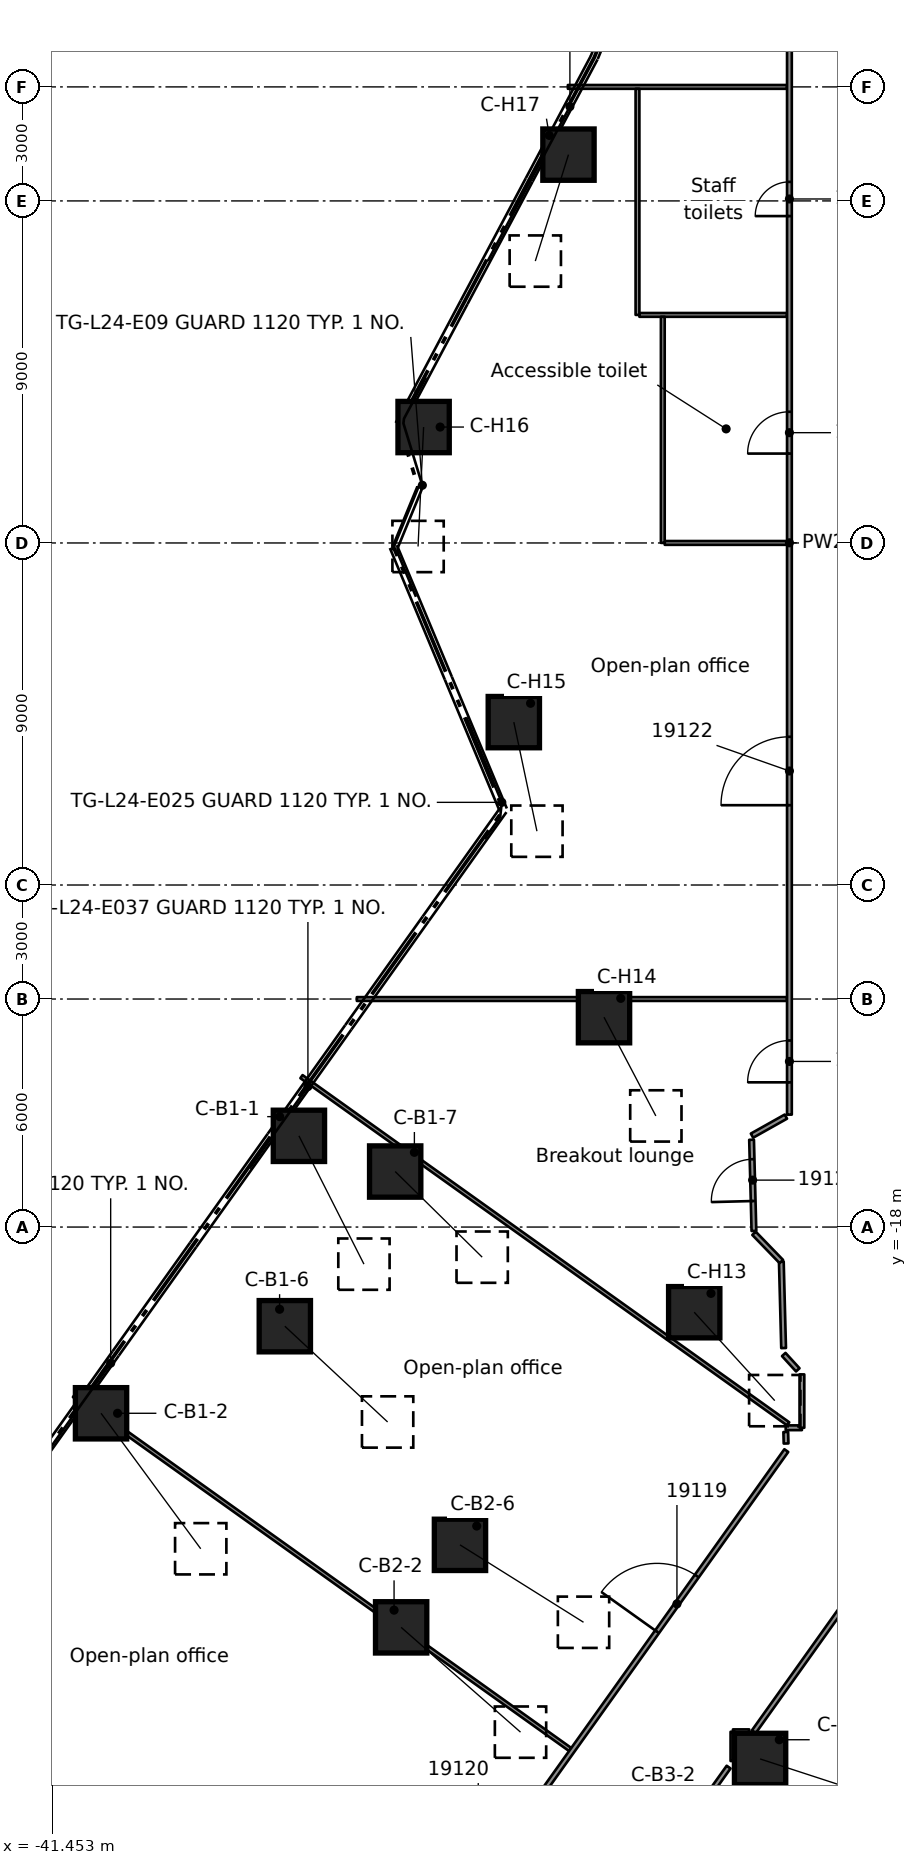
"""IFC4 building model, lengths in metres.
Left out: names, types, materials, properties, quantities, classifications, styles, units other than length and angle.
Written with IfcOpenShell. Run it as: python <this file> out.ifc"""

import sys

from ifc_helpers import new_model, si_unit, direction, frame, frame_2d, origin, origin_2d, place, context, subcontext, project, spatial, rectangle, extrude, element, fill, save


model = new_model("IFC4")
c1 = context("Model", 3, precision=1e-05, world=origin(), true_north=direction((0.0, 1.0)))
c2 = subcontext(c1, "Body", "Model", "MODEL_VIEW")
j1 = project(units=[si_unit("LENGTHUNIT", "METRE"), si_unit("PLANEANGLEUNIT", "RADIAN")], contexts=[c1])
p1 = place(None, origin())
s1 = spatial("IfcSite", under=j1, at=p1, CompositionType="ELEMENT")
p2 = place(p1, origin())
s2 = spatial("IfcBuilding", under=s1, at=p2, CompositionType="ELEMENT")
p3 = place(p2, frame((0.0, 0.0, 98.2)))
s3 = spatial("IfcBuildingStorey", under=s2, at=p3, CompositionType="ELEMENT", Elevation=98.2)
p4 = place(p3, frame((-34.957, -15.6, 0.534), z_axis=(0.357328867204, -0.705071857263, 0.612527351844), x_axis=(0.891988612188, 0.452057867675, 0.0)))
e1 = element("IfcColumn", 1, at=p4, inside=s3, PredefinedType="COLUMN", context=c2, shape_type="SweptSolid", body=[
    extrude(rectangle(XDim=1.35, YDim=1.35, at=origin_2d()), origin(), (0.0, 0.0, 1.0), 4.788),
])
p5 = place(p3, frame((-40.164, -22.9, 0.567), z_axis=(0.497397176201, -0.676050908792, 0.543646224882), x_axis=(0.805479866843, 0.592623138352, 0.0)))
e2 = element("IfcColumn", 2, at=p5, inside=s3, PredefinedType="COLUMN", context=c2, shape_type="SweptSolid", body=[
    extrude(rectangle(XDim=1.35, YDim=1.35, at=origin_2d()), origin(), (0.0, 0.0, 1.0), 5.273),
])
p6 = place(p3, frame((-45.371, -30.2, 0.593), z_axis=(0.602031387632, -0.638952324691, 0.478850848468), x_axis=(0.727822118455, 0.685765968744, 0.0)))
e3 = element("IfcColumn", 3, at=p6, inside=s3, PredefinedType="COLUMN", context=c2, shape_type="SweptSolid", body=[
    extrude(rectangle(XDim=1.35, YDim=1.35, at=origin_2d()), origin(), (0.0, 0.0, 1.0), 5.878),
])
p7 = place(p3, frame((-35.328, -20.609, 0.528), z_axis=(0.572340427973, -0.533233856624, 0.622967164991), x_axis=(0.681668558156, 0.731661107906, 0.0)))
e4 = element("IfcColumn", 4, at=p7, inside=s3, PredefinedType="COLUMN", context=c2, shape_type="SweptSolid", body=[
    extrude(rectangle(XDim=1.35, YDim=1.35, at=origin_2d()), origin(), (0.0, 0.0, 1.0), 4.726),
])
p8 = place(p3, frame((-32.424, -16.539, 0.492), z_axis=(0.519558048031, -0.511356833109, 0.684524377914), x_axis=(0.701459353772, 0.712709460443, 0.0)))
e5 = element("IfcColumn", 5, at=p8, inside=s3, PredefinedType="COLUMN", context=c2, shape_type="SweptSolid", body=[
    extrude(rectangle(XDim=1.35, YDim=1.35, at=origin_2d()), origin(), (0.0, 0.0, 1.0), 4.406),
])
p9 = place(p3, frame((-32.267, -28.533, 0.555), z_axis=(0.618188651788, -0.542608770763, 0.568698964912), x_axis=(0.659670030756, 0.751555354264, 0.0)))
e6 = element("IfcColumn", 6, at=p9, inside=s3, PredefinedType="COLUMN", context=c2, shape_type="SweptSolid", body=[
    extrude(rectangle(XDim=1.35, YDim=1.35, at=origin_2d()), origin(), (0.0, 0.0, 1.0), 5.081),
])
p10 = place(p3, frame((-30.719, -26.362, 0.537), z_axis=(0.673755446544, -0.422134401511, 0.606511455221), x_axis=(0.530936748584, 0.847411452013, 0.0)))
e7 = element("IfcColumn", 7, at=p10, inside=s3, PredefinedType="COLUMN", context=c2, shape_type="SweptSolid", body=[
    extrude(rectangle(XDim=1.35, YDim=1.35, at=origin_2d()), origin(), (0.0, 0.0, 1.0), 4.825),
])
p11 = place(p3, frame((-22.822, -31.995, 0.544), z_axis=(0.76622208447, -0.249848553778, 0.592013021347), x_axis=(0.310013339183, 0.950732207053, 0.0)))
e8 = element("IfcColumn", 8, at=p11, inside=s3, PredefinedType="COLUMN", context=c2, shape_type="SweptSolid", body=[
    extrude(rectangle(XDim=1.35, YDim=1.35, at=origin_2d()), origin(), (0.0, 0.0, 1.0), 4.919),
])
p12 = place(p3, frame((-24.555, -20.241, 0.486), z_axis=(0.485285534425, -0.532701381088, 0.693344927626), x_axis=(0.739240974363, 0.673441000997, 0.0)))
e9 = element("IfcColumn", 9, at=p12, inside=s3, PredefinedType="COLUMN", context=c2, shape_type="SweptSolid", body=[
    extrude(rectangle(XDim=1.35, YDim=1.35, at=origin_2d()), origin(), (0.0, 0.0, 1.0), 4.366),
])
p13 = place(p3, frame((-26.929, -12.478, 0.467), z_axis=(0.32137646831, -0.612093610038, 0.722536212357), x_axis=(0.885381636401, 0.464864881362, 0.0)))
e10 = element("IfcColumn", 10, at=p13, inside=s3, PredefinedType="COLUMN", context=c2, shape_type="SweptSolid", body=[
    extrude(rectangle(XDim=1.35, YDim=1.35, at=origin_2d()), origin(), (0.0, 0.0, 1.0), 4.244),
])
p14 = place(p3, frame((-29.302, -4.714, 0.467), z_axis=(0.14323977711, -0.676218305191, 0.722641799218), x_axis=(0.97829295653, 0.207226666249, 0.0)))
e11 = element("IfcColumn", 11, at=p14, inside=s3, PredefinedType="COLUMN", context=c2, shape_type="SweptSolid", body=[
    extrude(rectangle(XDim=1.35, YDim=1.35, at=origin_2d()), origin(), (0.0, 0.0, 1.0), 4.244),
])
p15 = place(p3, frame((-31.676, 3.05, 0.486), z_axis=(-0.03343666302, -0.719838795512, 0.693335487366), x_axis=(0.998922931625, -0.046400179673, 0.0)))
e12 = element("IfcColumn", 12, at=p15, inside=s3, PredefinedType="COLUMN", context=c2, shape_type="SweptSolid", body=[
    extrude(rectangle(XDim=1.35, YDim=1.35, at=origin_2d()), origin(), (0.0, 0.0, 1.0), 4.366),
])
p16 = place(p3, frame((-27.864, 10.218, 0.467), z_axis=(-0.205700307178, -0.659955152196, 0.722597108157), x_axis=(0.954700334487, -0.297568935425, 0.0)))
e13 = element("IfcColumn", 13, at=p16, inside=s3, PredefinedType="COLUMN", context=c2, shape_type="SweptSolid", body=[
    extrude(rectangle(XDim=1.35, YDim=1.35, at=origin_2d()), origin(), (0.0, 0.0, 1.0), 4.244),
])
p17 = place(p3, frame((-22.984, -18.102, 0.0), z_axis=(0.0, 0.0, 1.0), x_axis=(-0.025838526194, 0.999666129547, 0.0)))
e14 = element("IfcWall", 14, at=p17, inside=s3, PredefinedType="PARTITIONING", context=c2, shape_type="SweptSolid", body=[
    extrude(rectangle(XDim=2.4, YDim=0.125, at=frame_2d((1.2, 0.0))), origin(), (0.0, 0.0, 1.0), 3.58),
])
p18 = place(p17, frame((0.788, 0.0, 0.0)))
e15 = element("IfcOpeningElement", 15, at=p18, cuts=e14, PredefinedType="OPENING", context=c2, shape_type="SweptSolid", body=[
    extrude(rectangle(XDim=1.1, YDim=2.1, at=frame_2d((0.55, 1.05))), frame((0.0, 0.073, 0.0), z_axis=(0.0, -1.0, 0.0), x_axis=(1.0, 0.0, 0.0)), (0.0, 0.0, 1.0), 0.145),
])
p19 = place(p3, frame((-22.263, -18.907, 0.0), z_axis=(0.0, 0.0, 1.0), x_axis=(0.026365871187, -0.999652359991, 0.0)))
e16 = element("IfcWall", 16, at=p19, inside=s3, PredefinedType="PARTITIONING", context=c2, shape_type="SweptSolid", body=[
    extrude(rectangle(XDim=2.278, YDim=0.125, at=frame_2d((1.139, 0.0))), origin(), (0.0, 0.0, 1.0), 3.58),
])
p20 = place(p3, frame((-22.146, -23.392, 0.0), z_axis=(0.0, 0.0, 1.0), x_axis=(0.026582061999, -0.999646634556, 0.0)))
e17 = element("IfcWall", 17, at=p20, inside=s3, PredefinedType="PARTITIONING", context=c2, shape_type="SweptSolid", body=[
    extrude(rectangle(XDim=0.303, YDim=0.125, at=frame_2d((0.151, 0.0))), origin(), (0.0, 0.0, 1.0), 3.58),
])
p21 = place(p3, frame((-22.199, -21.353, 0.0), z_axis=(0.0, 0.0, 1.0), x_axis=(0.673360118055, -0.739314649803, 0.0)))
e18 = element("IfcWall", 18, at=p21, inside=s3, PredefinedType="PARTITIONING", context=c2, shape_type="SweptSolid", body=[
    extrude(rectangle(XDim=0.548, YDim=0.125, at=frame_2d((0.274, 0.0))), origin(), (0.0, 0.0, 1.0), 3.58),
])
p22 = place(p3, frame((-46.044, -29.68, 0.0), z_axis=(0.0, 0.0, 1.0), x_axis=(0.814128729821, -0.580684433475, 0.0)))
e19 = element("IfcWall", 19, at=p22, inside=s3, PredefinedType="PARTITIONING", context=c2, shape_type="SweptSolid", body=[
    extrude(rectangle(XDim=16.269, YDim=0.1, at=frame_2d((8.134, 0.0))), origin(), (0.0, 0.0, 1.0), 3.58),
])
p23 = place(p3, frame((-40.875, -22.433, 0.0), z_axis=(0.0, 0.0, 1.0), x_axis=(0.814077901833, -0.580755688519, 0.0)))
e20 = element("IfcWall", 20, at=p23, inside=s3, PredefinedType="PARTITIONING", context=c2, shape_type="SweptSolid", body=[
    extrude(rectangle(XDim=16.038, YDim=0.1, at=frame_2d((8.019, 0.0))), origin(), (0.0, 0.0, 1.0), 3.58),
])
p24 = place(p3, frame((-34.89, -14.042, 0.0), z_axis=(0.0, 0.0, 1.0), x_axis=(0.814087743621, -0.580741892484, 0.0)))
e21 = element("IfcWall", 21, at=p24, inside=s3, PredefinedType="PARTITIONING", context=c2, shape_type="SweptSolid", body=[
    extrude(rectangle(XDim=15.732, YDim=0.1, at=frame_2d((7.866, 0.0))), origin(), (0.0, 0.0, 1.0), 3.58),
])
p25 = place(p3, frame((-23.536, -31.28, 0.0), z_axis=(0.0, 0.0, 1.0), x_axis=(1.0, 0.0, 0.0)))
e22 = element("IfcWall", 22, at=p25, inside=s3, PredefinedType="PARTITIONING", context=c2, shape_type="SweptSolid", body=[
    extrude(rectangle(XDim=0.428, YDim=0.125, at=frame_2d((0.214, 0.0))), origin(), (0.0, 0.0, 1.0), 3.58),
])
p26 = place(p3, frame((-22.148, -23.281, 0.0), z_axis=(0.0, 0.0, 1.0), x_axis=(1.0, 0.0, 0.0)))
e23 = element("IfcWall", 23, at=p26, inside=s3, PredefinedType="PARTITIONING", context=c2, shape_type="SweptSolid", body=[
    extrude(rectangle(XDim=0.427, YDim=0.125, at=frame_2d((0.213, 0.0))), origin(), (0.0, 0.0, 1.0), 3.58),
])
p27 = place(p3, frame((-33.433, -12.0, 0.0), z_axis=(0.0, 0.0, 1.0), x_axis=(1.0, 0.0, 0.0)))
e24 = element("IfcWall", 24, at=p27, inside=s3, PredefinedType="PARTITIONING", context=c2, shape_type="SweptSolid", body=[
    extrude(rectangle(XDim=11.32, YDim=0.1, at=frame_2d((5.66, 0.0))), origin(), (0.0, 0.0, 1.0), 3.58),
])
p28 = place(p3, frame((-25.331, 0.001, 0.0), z_axis=(0.0, 0.0, 1.0), x_axis=(1.0, 0.0, 0.0)))
e25 = element("IfcWall", 25, at=p28, inside=s3, PredefinedType="PARTITIONING", context=c2, shape_type="SweptSolid", body=[
    extrude(rectangle(XDim=3.218, YDim=0.1, at=frame_2d((1.609, 0.0))), origin(), (0.0, 0.0, 1.0), 3.58),
])
p29 = place(p3, frame((-25.998, 6.001, 0.0), z_axis=(0.0, 0.0, 1.0), x_axis=(1.0, 0.0, 0.0)))
e26 = element("IfcWall", 26, at=p29, inside=s3, PredefinedType="PARTITIONING", context=c2, shape_type="SweptSolid", body=[
    extrude(rectangle(XDim=3.885, YDim=0.1, at=frame_2d((1.942, 0.0))), origin(), (0.0, 0.0, 1.0), 3.58),
])
p30 = place(p3, frame((-27.88, 12.0, 0.0), z_axis=(0.0, 0.0, 1.0), x_axis=(1.0, 0.0, 0.0)))
e27 = element("IfcWall", 27, at=p30, inside=s3, PredefinedType="PARTITIONING", context=c2, shape_type="SweptSolid", body=[
    extrude(rectangle(XDim=5.767, YDim=0.1, at=frame_2d((2.883, 0.0))), origin(), (0.0, 0.0, 1.0), 3.58),
])
p31 = place(p3, frame((-22.982, -18.164, 0.0), z_axis=(0.0, 0.0, 1.0), x_axis=(0.695441095264, -0.718583107941, 0.0)))
e28 = element("IfcWall", 28, at=p31, inside=s3, PredefinedType="PARTITIONING", context=c2, shape_type="SweptSolid", body=[
    extrude(rectangle(XDim=1.034, YDim=0.125, at=frame_2d((0.517, 0.0))), origin(), (0.0, 0.0, 1.0), 3.58),
])
p32 = place(p3, frame((-23.035, -15.595, 0.0), z_axis=(0.0, 0.0, 1.0), x_axis=(0.871862217124, 0.489751237213, 0.0)))
e29 = element("IfcWall", 29, at=p32, inside=s3, PredefinedType="PARTITIONING", context=c2, shape_type="SweptSolid", body=[
    extrude(rectangle(XDim=1.023, YDim=0.125, at=frame_2d((0.511, 0.0))), origin(), (0.0, 0.0, 1.0), 3.58),
])
p33 = place(p3, frame((-24.179, -43.454, 0.0), z_axis=(0.0, 0.0, 1.0), x_axis=(0.580695596551, 0.814120767544, 0.0)))
e30 = element("IfcWall", 30, at=p33, inside=s3, PredefinedType="PARTITIONING", context=c2, shape_type="SweptSolid", body=[
    extrude(rectangle(XDim=16.987, YDim=0.125, at=frame_2d((8.493, 0.0))), origin(), (0.0, 0.0, 1.0), 3.58),
])
p34 = place(p33, frame((11.767, 0.0, 0.0)))
e31 = element("IfcOpeningElement", 31, at=p34, cuts=e30, PredefinedType="OPENING", context=c2, shape_type="SweptSolid", body=[
    extrude(rectangle(XDim=1.1, YDim=2.1, at=frame_2d((0.55, 1.05))), frame((0.0, 0.073, 0.0), z_axis=(0.0, -1.0, 0.0), x_axis=(1.0, 0.0, 0.0)), (0.0, 0.0, 1.0), 0.145),
])
p35 = place(p33, frame((3.155, 0.0, 0.0)))
e32 = element("IfcOpeningElement", 32, at=p35, cuts=e30, PredefinedType="OPENING", context=c2, shape_type="SweptSolid", body=[
    extrude(rectangle(XDim=0.9, YDim=2.1, at=frame_2d((0.45, 1.05))), frame((0.0, 0.073, 0.0), z_axis=(0.0, -1.0, 0.0), x_axis=(1.0, 0.0, 0.0)), (0.0, 0.0, 1.0), 0.145),
])
p36 = place(p3, frame((-18.502, -24.992, 0.0), z_axis=(0.0, 0.0, 1.0), x_axis=(-0.580690883061, -0.814124129559, 0.0)))
e33 = element("IfcWall", 33, at=p36, inside=s3, PredefinedType="PARTITIONING", context=c2, shape_type="SweptSolid", body=[
    extrude(rectangle(XDim=7.724, YDim=0.125, at=frame_2d((3.862, 0.0))), origin(), (0.0, 0.0, 1.0), 3.58),
])
p37 = place(p3, frame((-24.536, -33.451, 0.0), z_axis=(0.0, 0.0, 1.0), x_axis=(0.581056427343, 0.813863273679, 0.0)))
e34 = element("IfcWall", 34, at=p37, inside=s3, PredefinedType="PARTITIONING", context=c2, shape_type="SweptSolid", body=[
    extrude(rectangle(XDim=1.525, YDim=0.125, at=frame_2d((0.762, 0.0))), origin(), (0.0, 0.0, 1.0), 3.58),
])
p38 = place(p3, frame((-32.593, -38.546, 0.0), z_axis=(0.0, 0.0, 1.0), x_axis=(0.580752168923, 0.814080412669, 0.0)))
e35 = element("IfcWall", 35, at=p38, inside=s3, PredefinedType="PARTITIONING", context=c2, shape_type="SweptSolid", body=[
    extrude(rectangle(XDim=18.013, YDim=0.125, at=frame_2d((9.006, 0.0))), origin(), (0.0, 0.0, 1.0), 3.58),
])
p39 = place(p38, frame((12.158, 0.0, 0.0)))
e36 = element("IfcOpeningElement", 36, at=p39, cuts=e35, PredefinedType="OPENING", context=c2, shape_type="SweptSolid", body=[
    extrude(rectangle(XDim=1.8, YDim=2.1, at=frame_2d((0.9, 1.05))), frame((0.0, 0.073, 0.0), z_axis=(0.0, -1.0, 0.0), x_axis=(1.0, 0.0, 0.0)), (0.0, 0.0, 1.0), 0.145),
])
p40 = place(p38, frame((3.155, 0.0, 0.0)))
e37 = element("IfcOpeningElement", 37, at=p40, cuts=e35, PredefinedType="OPENING", context=c2, shape_type="SweptSolid", body=[
    extrude(rectangle(XDim=1.8, YDim=2.1, at=frame_2d((0.9, 1.05))), frame((0.0, 0.073, 0.0), z_axis=(0.0, -1.0, 0.0), x_axis=(1.0, 0.0, 0.0)), (0.0, 0.0, 1.0), 0.145),
])
p41 = place(p3, frame((-21.721, -23.281, 0.0), z_axis=(0.0, 0.0, 1.0), x_axis=(0.0, 1.0, 0.0)))
e38 = element("IfcWall", 38, at=p41, inside=s3, PredefinedType="PARTITIONING", context=c2, shape_type="SweptSolid", body=[
    extrude(rectangle(XDim=1.404, YDim=0.125, at=frame_2d((0.702, 0.0))), origin(), (0.0, 0.0, 1.0), 3.58),
])
p42 = place(p3, frame((-22.05, -15.042, 0.0), z_axis=(0.0, 0.0, 1.0), x_axis=(0.0, 1.0, 0.0)))
e39 = element("IfcWall", 39, at=p42, inside=s3, PredefinedType="PARTITIONING", context=c2, shape_type="SweptSolid", body=[
    extrude(rectangle(XDim=30.093, YDim=0.125, at=frame_2d((15.046, 0.0))), origin(), (0.0, 0.0, 1.0), 3.58),
])
p43 = place(p42, frame((8.142, 0.0, 0.0)))
e40 = element("IfcOpeningElement", 40, at=p43, cuts=e39, PredefinedType="OPENING", context=c2, shape_type="SweptSolid", body=[
    extrude(rectangle(XDim=1.8, YDim=2.1, at=frame_2d((0.9, 1.05))), frame((0.0, 0.073, 0.0), z_axis=(0.0, -1.0, 0.0), x_axis=(1.0, 0.0, 0.0)), (0.0, 0.0, 1.0), 0.145),
])
p44 = place(p42, frame((0.85, 0.0, 0.0)))
e41 = element("IfcOpeningElement", 41, at=p44, cuts=e39, PredefinedType="OPENING", context=c2, shape_type="SweptSolid", body=[
    extrude(rectangle(XDim=1.1, YDim=2.1, at=frame_2d((0.55, 1.05))), frame((0.0, 0.073, 0.0), z_axis=(0.0, -1.0, 0.0), x_axis=(1.0, 0.0, 0.0)), (0.0, 0.0, 1.0), 0.145),
])
p45 = place(p42, frame((23.643, 0.0, 0.0)))
e42 = element("IfcOpeningElement", 42, at=p45, cuts=e39, PredefinedType="OPENING", context=c2, shape_type="SweptSolid", body=[
    extrude(rectangle(XDim=0.9, YDim=2.1, at=frame_2d((0.45, 1.05))), frame((0.0, 0.073, 0.0), z_axis=(0.0, -1.0, 0.0), x_axis=(1.0, 0.0, 0.0)), (0.0, 0.0, 1.0), 0.145),
])
p46 = place(p42, frame((17.394, 0.0, 0.0)))
e43 = element("IfcOpeningElement", 43, at=p46, cuts=e39, PredefinedType="OPENING", context=c2, shape_type="SweptSolid", body=[
    extrude(rectangle(XDim=1.1, YDim=2.1, at=frame_2d((0.55, 1.05))), frame((0.0, 0.073, 0.0), z_axis=(0.0, -1.0, 0.0), x_axis=(1.0, 0.0, 0.0)), (0.0, 0.0, 1.0), 0.145),
])
p47 = place(p3, frame((-23.536, -32.05, 0.0), z_axis=(0.0, 0.0, 1.0), x_axis=(0.0, 1.0, 0.0)))
e44 = element("IfcWall", 44, at=p47, inside=s3, PredefinedType="PARTITIONING", context=c2, shape_type="SweptSolid", body=[
    extrude(rectangle(XDim=0.77, YDim=0.125, at=frame_2d((0.385, 0.0))), origin(), (0.0, 0.0, 1.0), 3.58),
])
for number, where, z_axis, x_axis in (
    (45, (-25.382, 0.002, 0.0), (0.0, 0.0, 1.0), (0.0, 1.0, 0.0)),
    (46, (-26.048, 6.001, 0.0), (0.0, 0.0, 1.0), (0.0, 1.0, 0.0)),
):
    element("IfcWall", number, at=place(p3, frame(where, z_axis=z_axis, x_axis=x_axis)), inside=s3, PredefinedType="PARTITIONING", context=c2, shape_type="SweptSolid", body=[
        extrude(rectangle(XDim=5.949, YDim=0.1, at=frame_2d((2.975, 0.0))), origin(), (0.0, 0.0, 1.0), 3.58),
    ])
p48 = place(p39, origin())
e47 = element("IfcDoor", 47, at=p48, inside=s3, OperationType="DOUBLE_DOOR_SINGLE_SWING", PredefinedType="DOOR", context=c2, shape_type="SweptSolid", body=[
    extrude(rectangle(XDim=1.8, YDim=2.1, at=frame_2d((0.9, 1.05))), frame((0.0, 0.025, 0.0), z_axis=(0.0, -1.0, 0.0), x_axis=(1.0, 0.0, 0.0)), (0.0, 0.0, 1.0), 0.05),
])
fill(e36, e47)
p49 = place(p43, origin())
e48 = element("IfcDoor", 48, at=p49, inside=s3, OperationType="DOUBLE_DOOR_SINGLE_SWING", PredefinedType="DOOR", context=c2, shape_type="SweptSolid", body=[
    extrude(rectangle(XDim=1.8, YDim=2.1, at=frame_2d((0.9, 1.05))), frame((0.0, 0.025, 0.0), z_axis=(0.0, -1.0, 0.0), x_axis=(1.0, 0.0, 0.0)), (0.0, 0.0, 1.0), 0.05),
])
fill(e40, e48)
p50 = place(p18, origin())
e49 = element("IfcDoor", 49, at=p50, inside=s3, OperationType="SINGLE_SWING_RIGHT", PredefinedType="DOOR", context=c2, shape_type="SweptSolid", body=[
    extrude(rectangle(XDim=1.1, YDim=2.1, at=frame_2d((0.55, 1.05))), frame((0.0, 0.025, 0.0), z_axis=(0.0, -1.0, 0.0), x_axis=(1.0, 0.0, 0.0)), (0.0, 0.0, 1.0), 0.05),
])
fill(e15, e49)
p51 = place(p44, origin())
e50 = element("IfcDoor", 50, at=p51, inside=s3, OperationType="SINGLE_SWING_LEFT", PredefinedType="DOOR", context=c2, shape_type="SweptSolid", body=[
    extrude(rectangle(XDim=1.1, YDim=2.1, at=frame_2d((0.55, 1.05))), frame((0.0, 0.025, 0.0), z_axis=(0.0, -1.0, 0.0), x_axis=(1.0, 0.0, 0.0)), (0.0, 0.0, 1.0), 0.05),
])
fill(e41, e50)
p52 = place(p45, origin())
e51 = element("IfcDoor", 51, at=p52, inside=s3, OperationType="SINGLE_SWING_RIGHT", PredefinedType="DOOR", context=c2, shape_type="SweptSolid", body=[
    extrude(rectangle(XDim=0.9, YDim=2.1, at=frame_2d((0.45, 1.05))), frame((0.0, 0.025, 0.0), z_axis=(0.0, -1.0, 0.0), x_axis=(1.0, 0.0, 0.0)), (0.0, 0.0, 1.0), 0.05),
])
fill(e42, e51)
p53 = place(p46, origin())
e52 = element("IfcDoor", 52, at=p53, inside=s3, OperationType="SINGLE_SWING_RIGHT", PredefinedType="DOOR", context=c2, shape_type="SweptSolid", body=[
    extrude(rectangle(XDim=1.1, YDim=2.1, at=frame_2d((0.55, 1.05))), frame((0.0, 0.025, 0.0), z_axis=(0.0, -1.0, 0.0), x_axis=(1.0, 0.0, 0.0)), (0.0, 0.0, 1.0), 0.05),
])
fill(e43, e52)
save(model, sys.argv[1])
